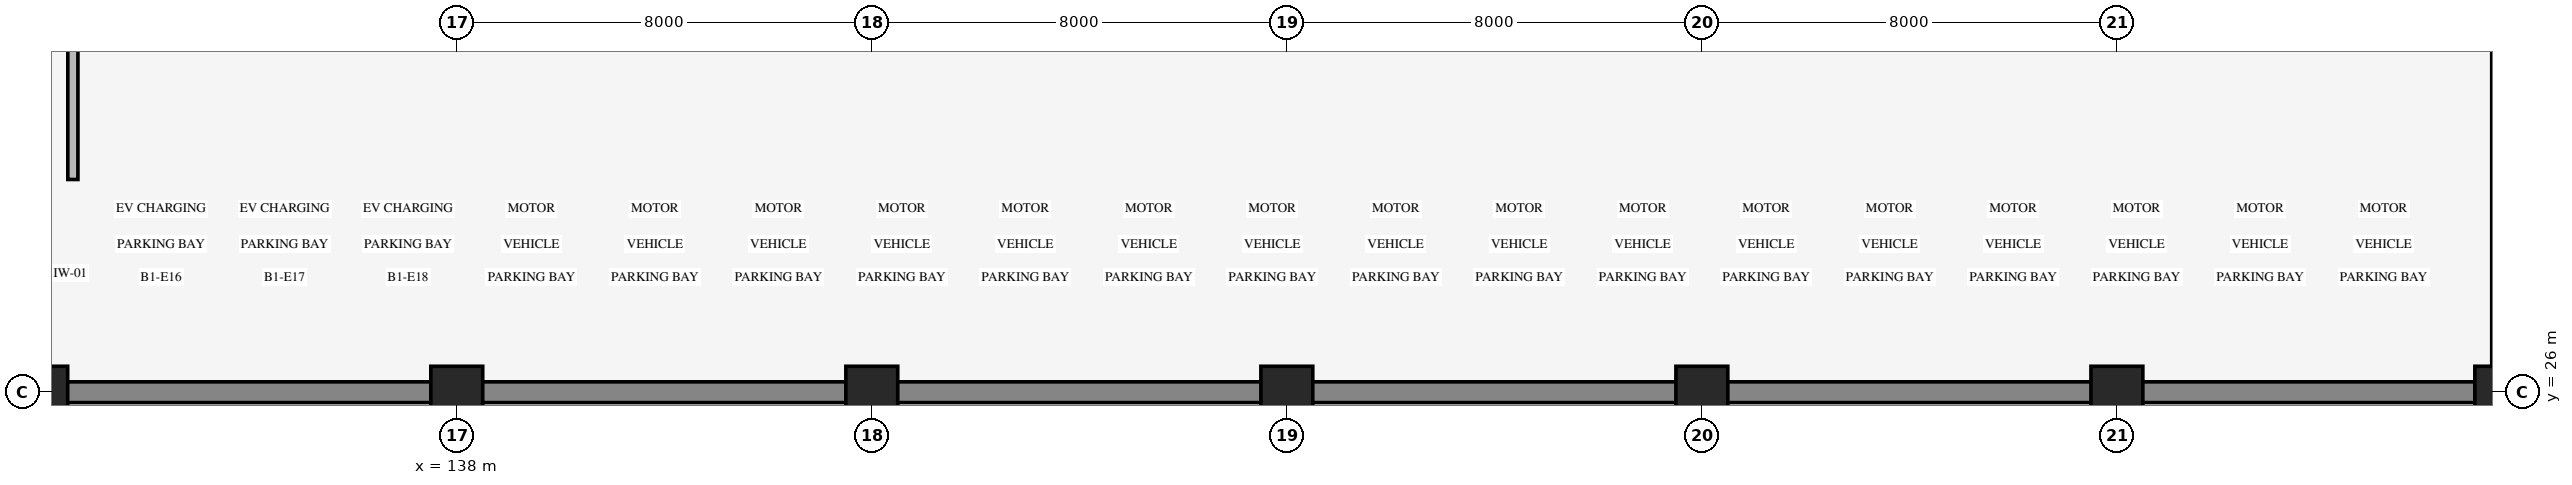
"""IFC4 building model, lengths in metres.
Left out: names, types, materials, properties, quantities, classifications, styles, units other than length and angle.
Written with IfcOpenShell. Run it as: python <this file> out.ifc"""

import sys

from ifc_helpers import new_model, si_unit, direction, frame, frame_2d, origin, origin_2d, place, context, subcontext, project, spatial, rectangle, extrude, element, save


model = new_model("IFC4")
c1 = context("Model", 3, precision=1e-05, world=origin(), true_north=direction((0.0, 1.0)))
c2 = subcontext(c1, "Body", "Model", "MODEL_VIEW")
j1 = project(units=[si_unit("LENGTHUNIT", "METRE"), si_unit("PLANEANGLEUNIT", "RADIAN")], contexts=[c1])
p1 = place(None, origin())
s1 = spatial("IfcSite", under=j1, at=p1, CompositionType="ELEMENT")
p2 = place(p1, origin())
s2 = spatial("IfcBuilding", under=s1, at=p2, CompositionType="ELEMENT")
p3 = place(p2, frame((0.0, 0.0, -4.5)))
s3 = spatial("IfcBuildingStorey", under=s2, at=p3, CompositionType="ELEMENT", Elevation=-4.5)
p4 = place(p3, frame((122.0, 26.0, 0.0), z_axis=(0.0, 0.0, 1.0), x_axis=(1.0, 0.0, 0.0)))
e1 = element("IfcWall", 1, at=p4, inside=s3, PredefinedType="SOLIDWALL", context=c2, shape_type="SweptSolid", body=[
    extrude(rectangle(XDim=55.4, YDim=0.4, at=frame_2d((27.7, 0.0))), origin(), (0.0, 0.0, 1.0), 4.22),
])
p5 = place(p3, frame((177.4, 26.0, 0.0), z_axis=(0.0, 0.0, 1.0), x_axis=(0.0, 1.0, 0.0)))
e2 = element("IfcWall", 2, at=p5, inside=s3, PredefinedType="SOLIDWALL", context=c2, shape_type="SweptSolid", body=[
    extrude(rectangle(XDim=80.0, YDim=0.35, at=frame_2d((40.0, 0.0))), origin(), (0.0, 0.0, 1.0), 4.22),
])
for number, where, z_axis, x_axis in (
    (3, (130.0, 26.0, 0.0), (0.0, 0.0, 1.0), (1.0, 0.0, 0.0)),
    (4, (138.0, 26.0, 0.0), (0.0, 0.0, 1.0), (1.0, 0.0, 0.0)),
    (5, (146.0, 26.0, 0.0), (0.0, 0.0, 1.0), (1.0, 0.0, 0.0)),
    (6, (154.0, 26.0, 0.0), (0.0, 0.0, 1.0), (1.0, 0.0, 0.0)),
    (7, (162.0, 26.0, 0.0), (0.0, 0.0, 1.0), (1.0, 0.0, 0.0)),
    (8, (170.0, 26.0, 0.0), (0.0, 0.0, 1.0), (1.0, 0.0, 0.0)),
    (9, (177.4, 26.0, 0.0), (0.0, 0.0, 1.0), (1.0, 0.0, 0.0)),
):
    element("IfcColumn", number, at=place(p3, frame(where, z_axis=z_axis, x_axis=x_axis)), inside=s3, PredefinedType="COLUMN", context=c2, shape_type="SweptSolid", body=[
        extrude(rectangle(XDim=1.0, YDim=1.0, at=origin_2d()), origin(), (0.0, 0.0, 1.0), 4.5),
    ])
p6 = place(p3, frame((130.6, 30.1, 0.0), z_axis=(0.0, 0.0, 1.0), x_axis=(0.0, 1.0, 0.0)))
e10 = element("IfcWall", 10, at=p6, inside=s3, PredefinedType="STANDARD", context=c2, shape_type="SweptSolid", body=[
    extrude(rectangle(XDim=15.9, YDim=0.195, at=frame_2d((7.95, 0.0))), origin(), (0.0, 0.0, 1.0), 3.13),
])
p7 = place(p6, frame((6.0, 0.0, 0.0)))
e11 = element("IfcOpeningElement", 11, at=p7, cuts=e10, PredefinedType="OPENING", context=c2, shape_type="SweptSolid", body=[
    extrude(rectangle(XDim=1.6, YDim=2.25, at=frame_2d((0.8, 1.125))), frame((0.0, 0.107, 0.0), z_axis=(0.0, -1.0, 0.0), x_axis=(1.0, 0.0, 0.0)), (0.0, 0.0, 1.0), 0.215),
])
save(model, sys.argv[1])
